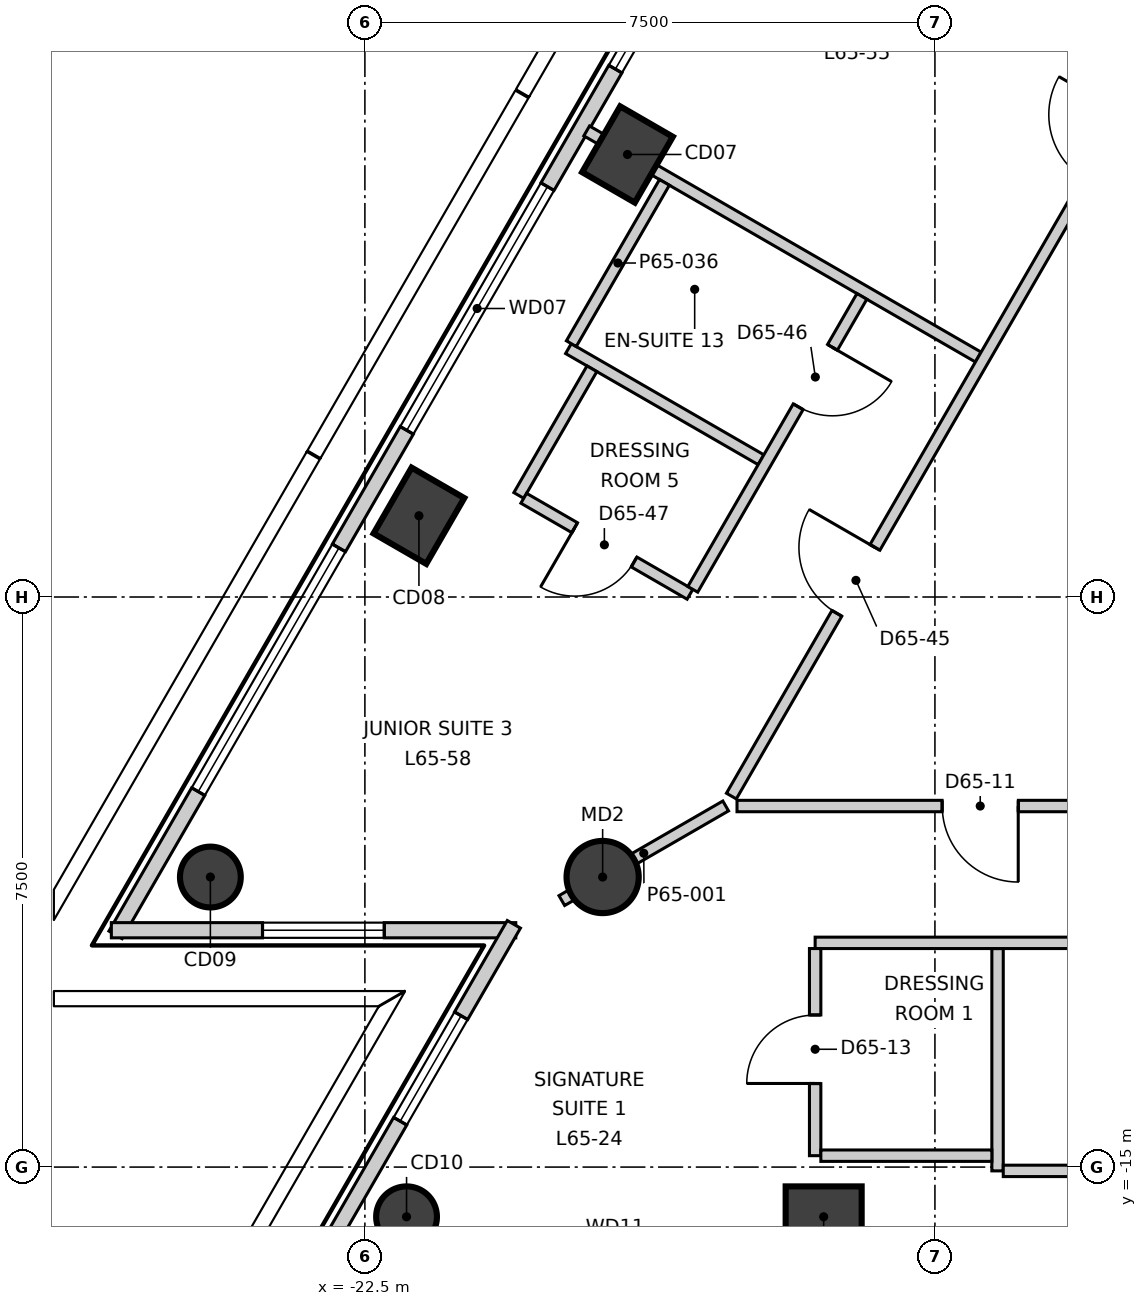
"""IFC4 building model, lengths in metres.
Left out: names, types, materials, properties, quantities, classifications, styles, units other than length and angle.
Written with IfcOpenShell. Run it as: python <this file> out.ifc"""

import sys

from ifc_helpers import new_model, si_unit, direction, frame, frame_2d, origin, origin_2d, place, context, subcontext, project, spatial, rectangle, circle, extrude, element, fill, save


model = new_model("IFC4")
c1 = context("Model", 3, precision=1e-05, world=origin(), true_north=direction((0.0, 1.0)))
c2 = subcontext(c1, "Body", "Model", "MODEL_VIEW")
j1 = project(units=[si_unit("LENGTHUNIT", "METRE"), si_unit("PLANEANGLEUNIT", "RADIAN")], contexts=[c1])
p1 = place(None, origin())
s1 = spatial("IfcSite", under=j1, at=p1, CompositionType="ELEMENT")
p2 = place(p1, origin())
s2 = spatial("IfcBuilding", under=s1, at=p2, CompositionType="ELEMENT")
p3 = place(p2, frame((0.0, 0.0, 279.1)))
s3 = spatial("IfcBuildingStorey", under=s2, at=p3, CompositionType="ELEMENT", Elevation=279.1)
for number, where, z_axis, x_axis in (
    (1, (-19.045, -1.678, -0.3), (0.0, 0.0, 1.0), (0.5, 0.866, 0.0)),
    (2, (-21.789, -6.431, -0.3), (0.0, 0.0, 1.0), (0.5, 0.866, 0.0)),
):
    element("IfcColumn", number, at=place(p3, frame(where, z_axis=z_axis, x_axis=x_axis)), inside=s3, PredefinedType="COLUMN", context=c2, shape_type="SweptSolid", body=[
        extrude(rectangle(XDim=1.0, YDim=0.8, at=origin_2d()), origin(), (0.0, 0.0, 1.0), 3.6),
    ])
for number, where, z_axis, x_axis in (
    (3, (-24.533, -11.184, -0.3), (0.0, 0.0, 1.0), (0.5, 0.866, 0.0)),
    (4, (-21.952, -15.654, -0.3), (0.0, 0.0, 1.0), (1.0, 0.0, 0.0)),
):
    element("IfcColumn", number, at=place(p3, frame(where, z_axis=z_axis, x_axis=x_axis)), inside=s3, PredefinedType="COLUMN", context=c2, shape_type="SweptSolid", body=[
        extrude(circle(Radius=0.4, at=origin_2d()), origin(), (0.0, 0.0, 1.0), 3.6),
    ])
p4 = place(p3, frame((-16.464, -15.654, -0.3), z_axis=(0.0, 0.0, 1.0), x_axis=(1.0, 0.0, 0.0)))
e5 = element("IfcColumn", 5, at=p4, inside=s3, PredefinedType="COLUMN", context=c2, shape_type="SweptSolid", body=[
    extrude(rectangle(XDim=1.0, YDim=0.8, at=origin_2d()), origin(), (0.0, 0.0, 1.0), 3.6),
])
p5 = place(p3, frame((-19.372, -11.184, -0.3), z_axis=(0.0, 0.0, 1.0), x_axis=(1.0, 0.0, 0.0)))
e6 = element("IfcColumn", 6, at=p5, inside=s3, PredefinedType="COLUMN", context=c2, shape_type="SweptSolid", body=[
    extrude(circle(Radius=0.475, at=origin_2d()), origin(), (0.0, 0.0, 1.0), 3.6),
])
p6 = place(p3, frame((-2.536, 28.316, 0.0), z_axis=(0.0, 0.0, 1.0), x_axis=(-0.500006870765, -0.86602143691, 0.0)))
e7 = element("IfcWall", 7, at=p6, inside=s3, PredefinedType="ELEMENTEDWALL", context=c2, shape_type="SweptSolid", body=[
    extrude(rectangle(XDim=46.49, YDim=0.2, at=frame_2d((23.245, 0.0))), origin(), (0.0, 0.0, 1.0), 3.3),
])
p7 = place(p6, frame((2.196, 0.0, 0.9)))
e8 = element("IfcOpeningElement", 8, at=p7, cuts=e7, PredefinedType="OPENING", context=c2, shape_type="SweptSolid", body=[
    extrude(rectangle(XDim=3.7, YDim=2.2, at=frame_2d((1.85, 1.1))), frame((0.0, 0.11, 0.0), z_axis=(0.0, -1.0, 0.0), x_axis=(1.0, 0.0, 0.0)), (0.0, 0.0, 1.0), 0.22),
])
p8 = place(p6, frame((7.684, 0.0, 0.9)))
e9 = element("IfcOpeningElement", 9, at=p8, cuts=e7, PredefinedType="OPENING", context=c2, shape_type="SweptSolid", body=[
    extrude(rectangle(XDim=3.7, YDim=2.2, at=frame_2d((1.85, 1.1))), frame((0.0, 0.11, 0.0), z_axis=(0.0, -1.0, 0.0), x_axis=(1.0, 0.0, 0.0)), (0.0, 0.0, 1.0), 0.22),
])
p9 = place(p6, frame((13.172, 0.0, 0.9)))
e10 = element("IfcOpeningElement", 10, at=p9, cuts=e7, PredefinedType="OPENING", context=c2, shape_type="SweptSolid", body=[
    extrude(rectangle(XDim=3.7, YDim=2.2, at=frame_2d((1.85, 1.1))), frame((0.0, 0.11, 0.0), z_axis=(0.0, -1.0, 0.0), x_axis=(1.0, 0.0, 0.0)), (0.0, 0.0, 1.0), 0.22),
])
p10 = place(p6, frame((18.66, 0.0, 0.9)))
e11 = element("IfcOpeningElement", 11, at=p10, cuts=e7, PredefinedType="OPENING", context=c2, shape_type="SweptSolid", body=[
    extrude(rectangle(XDim=3.7, YDim=2.2, at=frame_2d((1.85, 1.1))), frame((0.0, 0.11, 0.0), z_axis=(0.0, -1.0, 0.0), x_axis=(1.0, 0.0, 0.0)), (0.0, 0.0, 1.0), 0.22),
])
p11 = place(p6, frame((24.148, 0.0, 0.9)))
e12 = element("IfcOpeningElement", 12, at=p11, cuts=e7, PredefinedType="OPENING", context=c2, shape_type="SweptSolid", body=[
    extrude(rectangle(XDim=3.7, YDim=2.2, at=frame_2d((1.85, 1.1))), frame((0.0, 0.11, 0.0), z_axis=(0.0, -1.0, 0.0), x_axis=(1.0, 0.0, 0.0)), (0.0, 0.0, 1.0), 0.22),
])
p12 = place(p6, frame((29.636, 0.0, 0.9)))
e13 = element("IfcOpeningElement", 13, at=p12, cuts=e7, PredefinedType="OPENING", context=c2, shape_type="SweptSolid", body=[
    extrude(rectangle(XDim=3.7, YDim=2.2, at=frame_2d((1.85, 1.1))), frame((0.0, 0.11, 0.0), z_axis=(0.0, -1.0, 0.0), x_axis=(1.0, 0.0, 0.0)), (0.0, 0.0, 1.0), 0.22),
])
p13 = place(p6, frame((35.124, 0.0, 0.9)))
e14 = element("IfcOpeningElement", 14, at=p13, cuts=e7, PredefinedType="OPENING", context=c2, shape_type="SweptSolid", body=[
    extrude(rectangle(XDim=3.7, YDim=2.2, at=frame_2d((1.85, 1.1))), frame((0.0, 0.11, 0.0), z_axis=(0.0, -1.0, 0.0), x_axis=(1.0, 0.0, 0.0)), (0.0, 0.0, 1.0), 0.22),
])
p14 = place(p6, frame((40.612, 0.0, 0.9)))
e15 = element("IfcOpeningElement", 15, at=p14, cuts=e7, PredefinedType="OPENING", context=c2, shape_type="SweptSolid", body=[
    extrude(rectangle(XDim=3.7, YDim=2.2, at=frame_2d((1.85, 1.1))), frame((0.0, 0.11, 0.0), z_axis=(0.0, -1.0, 0.0), x_axis=(1.0, 0.0, 0.0)), (0.0, 0.0, 1.0), 0.22),
])
p15 = place(p3, frame((-25.836, -11.884, 0.0), z_axis=(0.0, 0.0, 1.0), x_axis=(1.0, 0.0, 0.0)))
e16 = element("IfcWall", 16, at=p15, inside=s3, PredefinedType="ELEMENTEDWALL", context=c2, shape_type="SweptSolid", body=[
    extrude(rectangle(XDim=5.321, YDim=0.2, at=frame_2d((2.661, 0.0))), origin(), (0.0, 0.0, 1.0), 3.3),
])
p16 = place(p15, frame((1.99, 0.0, 0.9)))
e17 = element("IfcOpeningElement", 17, at=p16, cuts=e16, PredefinedType="OPENING", context=c2, shape_type="SweptSolid", body=[
    extrude(rectangle(XDim=1.6, YDim=2.2, at=frame_2d((0.8, 1.1))), frame((0.0, 0.11, 0.0), z_axis=(0.0, -1.0, 0.0), x_axis=(1.0, 0.0, 0.0)), (0.0, 0.0, 1.0), 0.22),
])
p17 = place(p3, frame((-20.54, -11.806, 0.0), z_axis=(0.0, 0.0, 1.0), x_axis=(-0.499834978903, -0.866120657798, 0.0)))
e18 = element("IfcWall", 18, at=p17, inside=s3, PredefinedType="ELEMENTEDWALL", context=c2, shape_type="SweptSolid", body=[
    extrude(rectangle(XDim=5.322, YDim=0.2, at=frame_2d((2.661, 0.0))), origin(), (0.0, 0.0, 1.0), 3.3),
])
p18 = place(p17, frame((1.39, 0.0, 0.9)))
e19 = element("IfcOpeningElement", 19, at=p18, cuts=e18, PredefinedType="OPENING", context=c2, shape_type="SweptSolid", body=[
    extrude(rectangle(XDim=1.6, YDim=2.2, at=frame_2d((0.8, 1.1))), frame((0.0, 0.11, 0.0), z_axis=(0.0, -1.0, 0.0), x_axis=(1.0, 0.0, 0.0)), (0.0, 0.0, 1.0), 0.22),
])
p19 = place(p3, frame((-19.909, -11.494, 0.0), z_axis=(0.0, 0.0, 1.0), x_axis=(0.86600757835, 0.500030873288, 0.0)))
e20 = element("IfcWall", 20, at=p19, inside=s3, PredefinedType="PARTITIONING", context=c2, shape_type="SweptSolid", body=[
    extrude(rectangle(XDim=2.49, YDim=0.15, at=frame_2d((1.245, 0.0))), origin(), (0.0, 0.0, 1.0), 2.8),
])
p20 = place(p3, frame((-19.582, -1.368, 0.0), z_axis=(0.0, 0.0, 1.0), x_axis=(0.865986712877, -0.50006700863, 0.0)))
e21 = element("IfcWall", 21, at=p20, inside=s3, PredefinedType="PARTITIONING", context=c2, shape_type="SweptSolid", body=[
    extrude(rectangle(XDim=5.949, YDim=0.15, at=frame_2d((2.975, 0.0))), origin(), (0.0, 0.0, 1.0), 3.3),
])
p21 = place(p3, frame((-17.678, -10.119, 0.0), z_axis=(0.0, 0.0, 1.0), x_axis=(0.500003190174, 0.866023561929, 0.0)))
e22 = element("IfcWall", 22, at=p21, inside=s3, PredefinedType="PARTITIONING", context=c2, shape_type="SweptSolid", body=[
    extrude(rectangle(XDim=35.356, YDim=0.15, at=frame_2d((17.678, 0.0))), origin(), (0.0, 0.0, 1.0), 3.3),
])
p22 = place(p21, frame((28.706, 0.0, 0.0)))
e23 = element("IfcOpeningElement", 23, at=p22, cuts=e22, PredefinedType="OPENING", context=c2, shape_type="SweptSolid", body=[
    extrude(rectangle(XDim=1.0, YDim=2.1, at=frame_2d((0.5, 1.05))), frame((0.0, 0.085, 0.0), z_axis=(0.0, -1.0, 0.0), x_axis=(1.0, 0.0, 0.0)), (0.0, 0.0, 1.0), 0.17),
])
p23 = place(p21, frame((18.74, 0.0, 0.0)))
e24 = element("IfcOpeningElement", 24, at=p23, cuts=e22, PredefinedType="OPENING", context=c2, shape_type="SweptSolid", body=[
    extrude(rectangle(XDim=1.0, YDim=2.1, at=frame_2d((0.5, 1.05))), frame((0.0, 0.085, 0.0), z_axis=(0.0, -1.0, 0.0), x_axis=(1.0, 0.0, 0.0)), (0.0, 0.0, 1.0), 0.17),
])
p24 = place(p21, frame((9.352, 0.0, 0.0)))
e25 = element("IfcOpeningElement", 25, at=p24, cuts=e22, PredefinedType="OPENING", context=c2, shape_type="SweptSolid", body=[
    extrude(rectangle(XDim=1.0, YDim=2.1, at=frame_2d((0.5, 1.05))), frame((0.0, 0.085, 0.0), z_axis=(0.0, -1.0, 0.0), x_axis=(1.0, 0.0, 0.0)), (0.0, 0.0, 1.0), 0.17),
])
p25 = place(p21, frame((2.777, 0.0, 0.0)))
e26 = element("IfcOpeningElement", 26, at=p25, cuts=e22, PredefinedType="OPENING", context=c2, shape_type="SweptSolid", body=[
    extrude(rectangle(XDim=1.0, YDim=2.1, at=frame_2d((0.5, 1.05))), frame((0.0, 0.085, 0.0), z_axis=(0.0, -1.0, 0.0), x_axis=(1.0, 0.0, 0.0)), (0.0, 0.0, 1.0), 0.17),
])
p26 = place(p3, frame((-17.604, -10.25, 0.0), z_axis=(0.0, 0.0, 1.0), x_axis=(1.0, 0.0, 0.0)))
e27 = element("IfcWall", 27, at=p26, inside=s3, PredefinedType="PARTITIONING", context=c2, shape_type="SweptSolid", body=[
    extrude(rectangle(XDim=35.358, YDim=0.15, at=frame_2d((17.679, 0.0))), origin(), (0.0, 0.0, 1.0), 3.3),
])
p27 = place(p26, frame((2.7, 0.0, 0.0)))
e28 = element("IfcOpeningElement", 28, at=p27, cuts=e27, PredefinedType="OPENING", context=c2, shape_type="SweptSolid", body=[
    extrude(rectangle(XDim=1.0, YDim=2.1, at=frame_2d((0.5, 1.05))), frame((0.0, 0.085, 0.0), z_axis=(0.0, -1.0, 0.0), x_axis=(1.0, 0.0, 0.0)), (0.0, 0.0, 1.0), 0.17),
])
p28 = place(p26, frame((14.878, 0.0, 0.0)))
e29 = element("IfcOpeningElement", 29, at=p28, cuts=e27, PredefinedType="OPENING", context=c2, shape_type="SweptSolid", body=[
    extrude(rectangle(XDim=1.0, YDim=2.1, at=frame_2d((0.5, 1.05))), frame((0.0, 0.085, 0.0), z_axis=(0.0, -1.0, 0.0), x_axis=(1.0, 0.0, 0.0)), (0.0, 0.0, 1.0), 0.17),
])
p29 = place(p26, frame((9.578, 0.0, 0.0)))
e30 = element("IfcOpeningElement", 30, at=p29, cuts=e27, PredefinedType="OPENING", context=c2, shape_type="SweptSolid", body=[
    extrude(rectangle(XDim=0.9, YDim=2.1, at=frame_2d((0.45, 1.05))), frame((0.0, 0.085, 0.0), z_axis=(0.0, -1.0, 0.0), x_axis=(1.0, 0.0, 0.0)), (0.0, 0.0, 1.0), 0.17),
])
p30 = place(p26, frame((11.678, 0.0, 0.0)))
e31 = element("IfcOpeningElement", 31, at=p30, cuts=e27, PredefinedType="OPENING", context=c2, shape_type="SweptSolid", body=[
    extrude(rectangle(XDim=0.9, YDim=2.1, at=frame_2d((0.45, 1.05))), frame((0.0, 0.085, 0.0), z_axis=(0.0, -1.0, 0.0), x_axis=(1.0, 0.0, 0.0)), (0.0, 0.0, 1.0), 0.17),
])
p31 = place(p26, frame((25.854, 0.0, 0.0)))
e32 = element("IfcOpeningElement", 32, at=p31, cuts=e27, PredefinedType="OPENING", context=c2, shape_type="SweptSolid", body=[
    extrude(rectangle(XDim=1.0, YDim=2.1, at=frame_2d((0.5, 1.05))), frame((0.0, 0.085, 0.0), z_axis=(0.0, -1.0, 0.0), x_axis=(1.0, 0.0, 0.0)), (0.0, 0.0, 1.0), 0.17),
])
p32 = place(p26, frame((20.554, 0.0, 0.0)))
e33 = element("IfcOpeningElement", 33, at=p32, cuts=e27, PredefinedType="OPENING", context=c2, shape_type="SweptSolid", body=[
    extrude(rectangle(XDim=0.9, YDim=2.1, at=frame_2d((0.45, 1.05))), frame((0.0, 0.085, 0.0), z_axis=(0.0, -1.0, 0.0), x_axis=(1.0, 0.0, 0.0)), (0.0, 0.0, 1.0), 0.17),
])
p33 = place(p26, frame((22.654, 0.0, 0.0)))
e34 = element("IfcOpeningElement", 34, at=p33, cuts=e27, PredefinedType="OPENING", context=c2, shape_type="SweptSolid", body=[
    extrude(rectangle(XDim=0.9, YDim=2.1, at=frame_2d((0.45, 1.05))), frame((0.0, 0.085, 0.0), z_axis=(0.0, -1.0, 0.0), x_axis=(1.0, 0.0, 0.0)), (0.0, 0.0, 1.0), 0.17),
])
p34 = place(p26, frame((31.43, 0.0, 0.0)))
e35 = element("IfcOpeningElement", 35, at=p34, cuts=e27, PredefinedType="OPENING", context=c2, shape_type="SweptSolid", body=[
    extrude(rectangle(XDim=1.0, YDim=2.1, at=frame_2d((0.5, 1.05))), frame((0.0, 0.085, 0.0), z_axis=(0.0, -1.0, 0.0), x_axis=(1.0, 0.0, 0.0)), (0.0, 0.0, 1.0), 0.17),
])
p35 = place(p3, frame((-19.822, -4.232, 0.0), z_axis=(0.0, 0.0, 1.0), x_axis=(0.866145293007, -0.499792288257, 0.0)))
e36 = element("IfcWall", 36, at=p35, inside=s3, PredefinedType="PARTITIONING", context=c2, shape_type="SweptSolid", body=[
    extrude(rectangle(XDim=2.926, YDim=0.15, at=frame_2d((1.463, 0.0))), origin(), (0.0, 0.0, 1.0), 3.3),
])
p36 = place(p3, frame((-20.475, -6.164, 0.0), z_axis=(0.0, 0.0, 1.0), x_axis=(0.499890818081, 0.866088430819, 0.0)))
e37 = element("IfcWall", 37, at=p36, inside=s3, PredefinedType="PARTITIONING", context=c2, shape_type="SweptSolid", body=[
    extrude(rectangle(XDim=1.925, YDim=0.15, at=frame_2d((0.962, 0.0))), origin(), (0.0, 0.0, 1.0), 3.3),
])
p37 = place(p3, frame((-20.41, -6.201, 0.0), z_axis=(0.0, 0.0, 1.0), x_axis=(0.86593764446, -0.500151972811, 0.0)))
e38 = element("IfcWall", 38, at=p37, inside=s3, PredefinedType="PARTITIONING", context=c2, shape_type="SweptSolid", body=[
    extrude(rectangle(XDim=2.526, YDim=0.15, at=frame_2d((1.263, 0.0))), origin(), (0.0, 0.0, 1.0), 3.3),
])
p38 = place(p37, frame((0.775, 0.0, 0.0)))
e39 = element("IfcOpeningElement", 39, at=p38, cuts=e38, PredefinedType="OPENING", context=c2, shape_type="SweptSolid", body=[
    extrude(rectangle(XDim=0.9, YDim=2.1, at=frame_2d((0.45, 1.05))), frame((0.0, 0.085, 0.0), z_axis=(0.0, -1.0, 0.0), x_axis=(1.0, 0.0, 0.0)), (0.0, 0.0, 1.0), 0.17),
])
p39 = place(p3, frame((-18.186, -7.399, 0.0), z_axis=(0.0, 0.0, 1.0), x_axis=(0.49999788721, 0.866026623601, 0.0)))
e40 = element("IfcWall", 40, at=p39, inside=s3, PredefinedType="PARTITIONING", context=c2, shape_type="SweptSolid", body=[
    extrude(rectangle(XDim=4.45, YDim=0.15, at=frame_2d((2.225, 0.0))), origin(), (0.0, 0.0, 1.0), 3.3),
])
p40 = place(p39, frame((2.775, 0.0, 0.0)))
e41 = element("IfcOpeningElement", 41, at=p40, cuts=e40, PredefinedType="OPENING", context=c2, shape_type="SweptSolid", body=[
    extrude(rectangle(XDim=0.9, YDim=2.1, at=frame_2d((0.45, 1.05))), frame((0.0, 0.085, 0.0), z_axis=(0.0, -1.0, 0.0), x_axis=(1.0, 0.0, 0.0)), (0.0, 0.0, 1.0), 0.17),
])
p41 = place(p3, frame((-19.784, -4.167, 0.0), z_axis=(0.0, 0.0, 1.0), x_axis=(0.499900713578, 0.866082719239, 0.0)))
e42 = element("IfcWall", 42, at=p41, inside=s3, PredefinedType="PARTITIONING", context=c2, shape_type="SweptSolid", body=[
    extrude(rectangle(XDim=2.45, YDim=0.15, at=frame_2d((1.225, 0.0))), origin(), (0.0, 0.0, 1.0), 3.3),
])
p42 = place(p3, frame((-14.176, -15.05, 0.0), z_axis=(0.0, 0.0, 1.0), x_axis=(0.0, 1.0, 0.0)))
e43 = element("IfcWall", 43, at=p42, inside=s3, PredefinedType="PARTITIONING", context=c2, shape_type="SweptSolid", body=[
    extrude(rectangle(XDim=2.925, YDim=0.15, at=frame_2d((1.462, 0.0))), origin(), (0.0, 0.0, 1.0), 3.3),
])
p43 = place(p3, frame((-16.576, -12.05, 0.0), z_axis=(0.0, 0.0, 1.0), x_axis=(1.0, 0.0, 0.0)))
e44 = element("IfcWall", 44, at=p43, inside=s3, PredefinedType="PARTITIONING", context=c2, shape_type="SweptSolid", body=[
    extrude(rectangle(XDim=5.525, YDim=0.15, at=frame_2d((2.762, 0.0))), origin(), (0.0, 0.0, 1.0), 3.3),
])
p44 = place(p43, frame((3.55, 0.0, 0.0)))
e45 = element("IfcOpeningElement", 45, at=p44, cuts=e44, PredefinedType="OPENING", context=c2, shape_type="SweptSolid", body=[
    extrude(rectangle(XDim=0.9, YDim=2.1, at=frame_2d((0.45, 1.05))), frame((0.0, 0.085, 0.0), z_axis=(0.0, -1.0, 0.0), x_axis=(1.0, 0.0, 0.0)), (0.0, 0.0, 1.0), 0.17),
])
p45 = place(p3, frame((-16.576, -14.85, 0.0), z_axis=(0.0, 0.0, 1.0), x_axis=(0.0, 1.0, 0.0)))
e46 = element("IfcWall", 46, at=p45, inside=s3, PredefinedType="PARTITIONING", context=c2, shape_type="SweptSolid", body=[
    extrude(rectangle(XDim=2.725, YDim=0.15, at=frame_2d((1.363, 0.0))), origin(), (0.0, 0.0, 1.0), 3.3),
])
p46 = place(p45, frame((0.95, 0.0, 0.0)))
e47 = element("IfcOpeningElement", 47, at=p46, cuts=e46, PredefinedType="OPENING", context=c2, shape_type="SweptSolid", body=[
    extrude(rectangle(XDim=0.9, YDim=2.1, at=frame_2d((0.45, 1.05))), frame((0.0, 0.085, 0.0), z_axis=(0.0, -1.0, 0.0), x_axis=(1.0, 0.0, 0.0)), (0.0, 0.0, 1.0), 0.17),
])
p47 = place(p3, frame((-16.501, -14.85, 0.0), z_axis=(0.0, 0.0, 1.0), x_axis=(1.0, 0.0, 0.0)))
e48 = element("IfcWall", 48, at=p47, inside=s3, PredefinedType="PARTITIONING", context=c2, shape_type="SweptSolid", body=[
    extrude(rectangle(XDim=2.25, YDim=0.15, at=frame_2d((1.125, 0.0))), origin(), (0.0, 0.0, 1.0), 3.3),
])
p48 = place(p3, frame((-14.101, -15.05, 0.0), z_axis=(0.0, 0.0, 1.0), x_axis=(1.0, 0.0, 0.0)))
e49 = element("IfcWall", 49, at=p48, inside=s3, PredefinedType="PARTITIONING", context=c2, shape_type="SweptSolid", body=[
    extrude(rectangle(XDim=3.05, YDim=0.15, at=frame_2d((1.525, 0.0))), origin(), (0.0, 0.0, 1.0), 3.3),
])
p49 = place(p12, origin())
e50 = element("IfcWindow", 50, at=p49, inside=s3, PartitioningType="SINGLE_PANEL", PredefinedType="WINDOW", context=c2, shape_type="SweptSolid", body=[
    extrude(rectangle(XDim=3.7, YDim=2.2, at=frame_2d((1.85, 1.1))), frame((0.0, 0.03, 0.0), z_axis=(0.0, -1.0, 0.0), x_axis=(1.0, 0.0, 0.0)), (0.0, 0.0, 1.0), 0.06),
])
fill(e13, e50)
p50 = place(p13, origin())
e51 = element("IfcWindow", 51, at=p50, inside=s3, PartitioningType="SINGLE_PANEL", PredefinedType="WINDOW", context=c2, shape_type="SweptSolid", body=[
    extrude(rectangle(XDim=3.7, YDim=2.2, at=frame_2d((1.85, 1.1))), frame((0.0, 0.03, 0.0), z_axis=(0.0, -1.0, 0.0), x_axis=(1.0, 0.0, 0.0)), (0.0, 0.0, 1.0), 0.06),
])
fill(e14, e51)
p51 = place(p14, origin())
e52 = element("IfcWindow", 52, at=p51, inside=s3, PartitioningType="SINGLE_PANEL", PredefinedType="WINDOW", context=c2, shape_type="SweptSolid", body=[
    extrude(rectangle(XDim=3.7, YDim=2.2, at=frame_2d((1.85, 1.1))), frame((0.0, 0.03, 0.0), z_axis=(0.0, -1.0, 0.0), x_axis=(1.0, 0.0, 0.0)), (0.0, 0.0, 1.0), 0.06),
])
fill(e15, e52)
p52 = place(p16, origin())
e53 = element("IfcWindow", 53, at=p52, inside=s3, PartitioningType="SINGLE_PANEL", PredefinedType="WINDOW", context=c2, shape_type="SweptSolid", body=[
    extrude(rectangle(XDim=1.6, YDim=2.2, at=frame_2d((0.8, 1.1))), frame((0.0, 0.03, 0.0), z_axis=(0.0, -1.0, 0.0), x_axis=(1.0, 0.0, 0.0)), (0.0, 0.0, 1.0), 0.06),
])
fill(e17, e53)
p53 = place(p18, origin())
e54 = element("IfcWindow", 54, at=p53, inside=s3, PartitioningType="SINGLE_PANEL", PredefinedType="WINDOW", context=c2, shape_type="SweptSolid", body=[
    extrude(rectangle(XDim=1.6, YDim=2.2, at=frame_2d((0.8, 1.1))), frame((0.0, 0.03, 0.0), z_axis=(0.0, -1.0, 0.0), x_axis=(1.0, 0.0, 0.0)), (0.0, 0.0, 1.0), 0.06),
])
fill(e19, e54)
p54 = place(p27, origin())
e55 = element("IfcDoor", 55, at=p54, inside=s3, OperationType="SINGLE_SWING_RIGHT", PredefinedType="DOOR", context=c2, shape_type="SweptSolid", body=[
    extrude(rectangle(XDim=1.0, YDim=2.1, at=frame_2d((0.5, 1.05))), frame((0.0, 0.025, 0.0), z_axis=(0.0, -1.0, 0.0), x_axis=(1.0, 0.0, 0.0)), (0.0, 0.0, 1.0), 0.05),
])
fill(e28, e55)
p55 = place(p46, origin())
e56 = element("IfcDoor", 56, at=p55, inside=s3, OperationType="SINGLE_SWING_RIGHT", PredefinedType="DOOR", context=c2, shape_type="SweptSolid", body=[
    extrude(rectangle(XDim=0.9, YDim=2.1, at=frame_2d((0.45, 1.05))), frame((0.0, 0.025, 0.0), z_axis=(0.0, -1.0, 0.0), x_axis=(1.0, 0.0, 0.0)), (0.0, 0.0, 1.0), 0.05),
])
fill(e47, e56)
p56 = place(p25, origin())
e57 = element("IfcDoor", 57, at=p56, inside=s3, OperationType="SINGLE_SWING_LEFT", PredefinedType="DOOR", context=c2, shape_type="SweptSolid", body=[
    extrude(rectangle(XDim=1.0, YDim=2.1, at=frame_2d((0.5, 1.05))), frame((0.0, 0.025, 0.0), z_axis=(0.0, -1.0, 0.0), x_axis=(1.0, 0.0, 0.0)), (0.0, 0.0, 1.0), 0.05),
])
fill(e26, e57)
p57 = place(p40, origin())
e58 = element("IfcDoor", 58, at=p57, inside=s3, OperationType="SINGLE_SWING_RIGHT", PredefinedType="DOOR", context=c2, shape_type="SweptSolid", body=[
    extrude(rectangle(XDim=0.9, YDim=2.1, at=frame_2d((0.45, 1.05))), frame((0.0, 0.025, 0.0), z_axis=(0.0, -1.0, 0.0), x_axis=(1.0, 0.0, 0.0)), (0.0, 0.0, 1.0), 0.05),
])
fill(e41, e58)
p58 = place(p38, origin())
e59 = element("IfcDoor", 59, at=p58, inside=s3, OperationType="SINGLE_SWING_LEFT", PredefinedType="DOOR", context=c2, shape_type="SweptSolid", body=[
    extrude(rectangle(XDim=0.9, YDim=2.1, at=frame_2d((0.45, 1.05))), frame((0.0, 0.025, 0.0), z_axis=(0.0, -1.0, 0.0), x_axis=(1.0, 0.0, 0.0)), (0.0, 0.0, 1.0), 0.05),
])
fill(e39, e59)
save(model, sys.argv[1])
